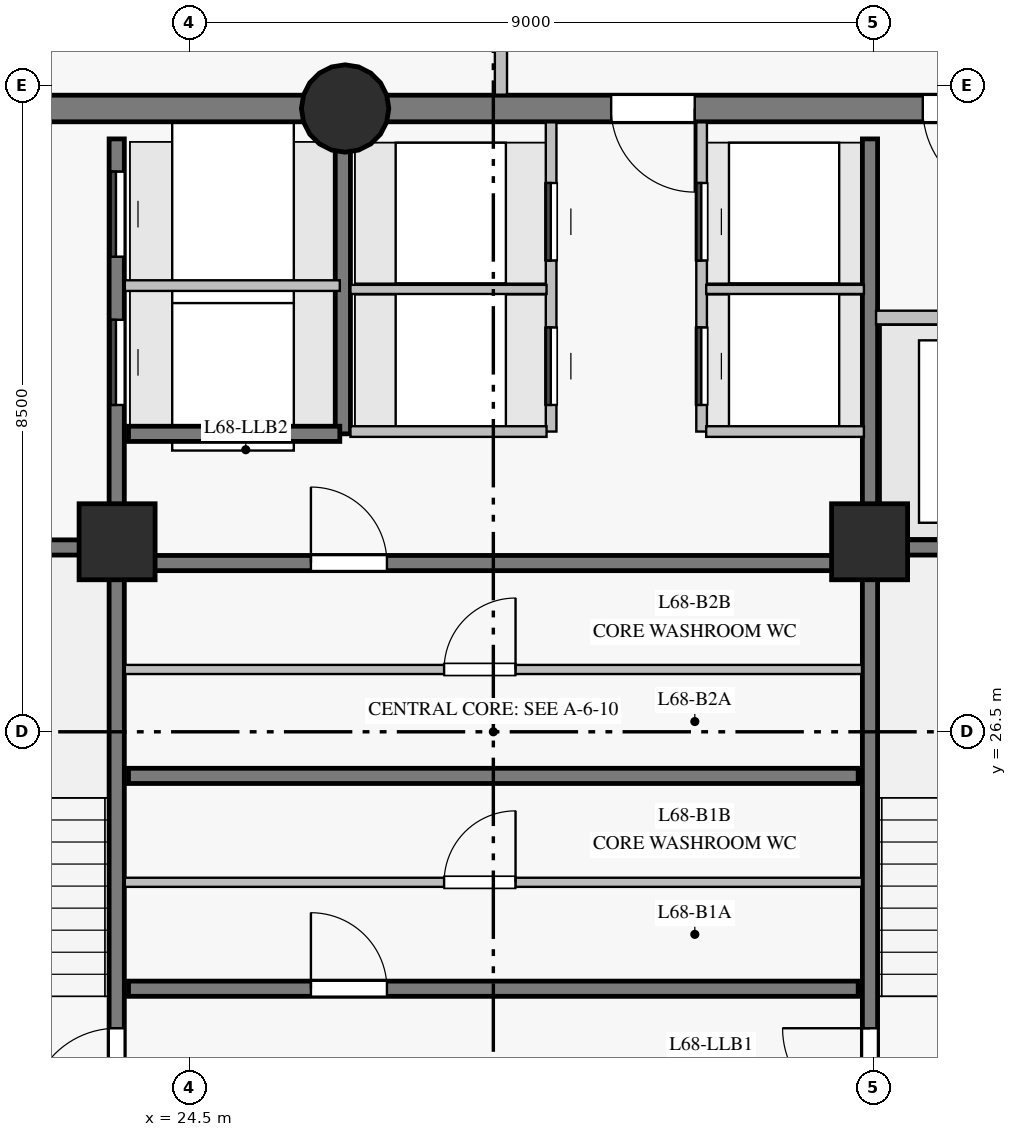
"""IFC4 building model, lengths in metres.
Left out: names, types, materials, properties, quantities, classifications, styles, units other than length and angle.
Written with IfcOpenShell. Run it as: python <this file> out.ifc"""

import sys

from ifc_helpers import new_model, si_unit, direction, frame, frame_2d, origin, origin_with_axes, origin_2d, place, context, subcontext, project, spatial, rectangle, circle, extrude, source, transform, mapped, element, fill, save


model = new_model("IFC4")
c1 = context("Model", 3, precision=1e-05, world=origin(), true_north=direction((0.0, 1.0)))
c2 = subcontext(c1, "Body", "Model", "MODEL_VIEW")
j1 = project(units=[si_unit("LENGTHUNIT", "METRE"), si_unit("PLANEANGLEUNIT", "RADIAN")], contexts=[c1])
p1 = place(None, origin())
s1 = spatial("IfcSite", under=j1, at=p1, CompositionType="ELEMENT")
p2 = place(p1, origin())
s2 = spatial("IfcBuilding", under=s1, at=p2, CompositionType="ELEMENT")
p3 = place(p2, frame((0.0, 0.0, 232.15)))
s3 = spatial("IfcBuildingStorey", under=s2, at=p3, CompositionType="ELEMENT", Elevation=232.15)
p4 = place(p3, frame((37.5, 34.7, 0.0), z_axis=(0.0, 0.0, 1.0), x_axis=(-1.0, 0.0, 0.0)))
e1 = element("IfcWall", 1, at=p4, inside=s3, PredefinedType="SHEAR", context=c2, shape_type="SweptSolid", body=[
    extrude(rectangle(XDim=10.95, YDim=0.35, at=frame_2d((5.475, 0.0))), origin(), (0.0, 0.0, 1.0), 2.85),
])
p5 = place(p4, frame((2.15, 0.0, 0.0)))
e2 = element("IfcOpeningElement", 2, at=p5, cuts=e1, PredefinedType="OPENING", context=c2, shape_type="SweptSolid", body=[
    extrude(rectangle(XDim=1.2, YDim=2.15, at=frame_2d((0.6, 1.075))), frame((0.0, 0.185, 0.0), z_axis=(0.0, -1.0, 0.0), x_axis=(1.0, 0.0, 0.0)), (0.0, 0.0, 1.0), 0.37),
])
p6 = place(p4, frame((6.35, 0.0, 0.0)))
e3 = element("IfcOpeningElement", 3, at=p6, cuts=e1, PredefinedType="OPENING", context=c2, shape_type="SweptSolid", body=[
    extrude(rectangle(XDim=1.1, YDim=2.15, at=frame_2d((0.55, 1.075))), frame((0.0, 0.185, 0.0), z_axis=(0.0, -1.0, 0.0), x_axis=(1.0, 0.0, 0.0)), (0.0, 0.0, 1.0), 0.37),
])
p7 = place(p3, frame((26.55, 34.7, 0.0), z_axis=(0.0, 0.0, 1.0), x_axis=(-1.0, 0.0, 0.0)))
e4 = element("IfcWall", 4, at=p7, inside=s3, PredefinedType="SHEAR", context=c2, shape_type="SweptSolid", body=[
    extrude(rectangle(XDim=7.05, YDim=0.35, at=frame_2d((3.525, 0.0))), origin(), (0.0, 0.0, 1.0), 2.85),
])
m1 = source(origin_with_axes(), c2, "Body", "SweptSolid", [
    extrude(circle(Radius=0.575, at=origin_2d()), origin(), (0.0, 0.0, 1.0), 3.05),
])
p8 = place(p3, frame((26.55, 34.7, 0.0), z_axis=(0.0, 0.0, 1.0), x_axis=(1.0, 0.0, 0.0)))
e5 = element("IfcColumn", 5, at=p8, inside=s3, PredefinedType="COLUMN", context=c2, shape_type="MappedRepresentation", body=[
    mapped(m1, transform((0.0, 0.0, 0.0), scale=1.0)),
])
m2 = source(origin_with_axes(), c2, "Body", "SweptSolid", [
    extrude(rectangle(XDim=1.0, YDim=1.0, at=origin_2d()), origin(), (0.0, 0.0, 1.0), 3.05),
])
for number, where, z_axis, x_axis in (
    (6, (23.55, 29.0, 0.0), (0.0, 0.0, 1.0), (1.0, 0.0, 0.0)),
    (7, (33.45, 29.0, 0.0), (0.0, 0.0, 1.0), (1.0, 0.0, 0.0)),
):
    element("IfcColumn", number, at=place(p3, frame(where, z_axis=z_axis, x_axis=x_axis)), inside=s3, PredefinedType="COLUMN", context=c2, shape_type="MappedRepresentation", body=[
        mapped(m2, transform((0.0, 0.0, 0.0), scale=1.0)),
    ])
p9 = place(p3, frame((23.545, 18.7, 0.0), z_axis=(0.0, 0.0, 1.0), x_axis=(0.0, 1.0, 0.0)))
e8 = element("IfcWall", 8, at=p9, inside=s3, PredefinedType="SHEAR", context=c2, shape_type="SweptSolid", body=[
    extrude(rectangle(XDim=15.6, YDim=0.2, at=frame_2d((7.8, 0.0))), origin(), (0.0, 0.0, 1.0), 2.85),
])
p10 = place(p9, frame((2.75, 0.0, 0.0)))
e9 = element("IfcOpeningElement", 9, at=p10, cuts=e8, PredefinedType="OPENING", context=c2, shape_type="SweptSolid", body=[
    extrude(rectangle(XDim=1.15, YDim=2.15, at=frame_2d((0.575, 1.075))), frame((0.0, 0.11, 0.0), z_axis=(0.0, -1.0, 0.0), x_axis=(1.0, 0.0, 0.0)), (0.0, 0.0, 1.0), 0.22),
])
p11 = place(p9, frame((0.14, 0.0, 0.0)))
e10 = element("IfcOpeningElement", 10, at=p11, cuts=e8, PredefinedType="OPENING", context=c2, shape_type="SweptSolid", body=[
    extrude(rectangle(XDim=0.88, YDim=2.1, at=frame_2d((0.44, 1.05))), frame((0.0, 0.11, 0.0), z_axis=(0.0, -1.0, 0.0), x_axis=(1.0, 0.0, 0.0)), (0.0, 0.0, 1.0), 0.22),
])
p12 = place(p9, frame((1.36, 0.0, 0.0)))
e11 = element("IfcOpeningElement", 11, at=p12, cuts=e8, PredefinedType="OPENING", context=c2, shape_type="SweptSolid", body=[
    extrude(rectangle(XDim=0.88, YDim=2.1, at=frame_2d((0.44, 1.05))), frame((0.0, 0.11, 0.0), z_axis=(0.0, -1.0, 0.0), x_axis=(1.0, 0.0, 0.0)), (0.0, 0.0, 1.0), 0.22),
])
p13 = place(p9, frame((12.1, 0.0, 0.0)))
e12 = element("IfcOpeningElement", 12, at=p13, cuts=e8, PredefinedType="OPENING", context=c2, shape_type="SweptSolid", body=[
    extrude(rectangle(XDim=1.12, YDim=2.15, at=frame_2d((0.56, 1.075))), frame((0.0, 0.11, 0.0), z_axis=(0.0, -1.0, 0.0), x_axis=(1.0, 0.0, 0.0)), (0.0, 0.0, 1.0), 0.22),
])
p14 = place(p9, frame((14.05, 0.0, 0.0)))
e13 = element("IfcOpeningElement", 13, at=p14, cuts=e8, PredefinedType="OPENING", context=c2, shape_type="SweptSolid", body=[
    extrude(rectangle(XDim=1.12, YDim=2.15, at=frame_2d((0.56, 1.075))), frame((0.0, 0.11, 0.0), z_axis=(0.0, -1.0, 0.0), x_axis=(1.0, 0.0, 0.0)), (0.0, 0.0, 1.0), 0.22),
])
p15 = place(p3, frame((33.455, 18.7, 0.0), z_axis=(0.0, 0.0, 1.0), x_axis=(0.0, 1.0, 0.0)))
e14 = element("IfcWall", 14, at=p15, inside=s3, PredefinedType="SHEAR", context=c2, shape_type="SweptSolid", body=[
    extrude(rectangle(XDim=15.6, YDim=0.2, at=frame_2d((7.8, 0.0))), origin(), (0.0, 0.0, 1.0), 2.85),
])
p16 = place(p15, frame((2.75, 0.0, 0.0)))
e15 = element("IfcOpeningElement", 15, at=p16, cuts=e14, PredefinedType="OPENING", context=c2, shape_type="SweptSolid", body=[
    extrude(rectangle(XDim=1.15, YDim=2.15, at=frame_2d((0.575, 1.075))), frame((0.0, 0.11, 0.0), z_axis=(0.0, -1.0, 0.0), x_axis=(1.0, 0.0, 0.0)), (0.0, 0.0, 1.0), 0.22),
])
p17 = place(p15, frame((0.55, 0.0, 0.0)))
e16 = element("IfcOpeningElement", 16, at=p17, cuts=e14, PredefinedType="OPENING", context=c2, shape_type="SweptSolid", body=[
    extrude(rectangle(XDim=0.94, YDim=2.1, at=frame_2d((0.47, 1.05))), frame((0.0, 0.11, 0.0), z_axis=(0.0, -1.0, 0.0), x_axis=(1.0, 0.0, 0.0)), (0.0, 0.0, 1.0), 0.22),
])
p18 = place(p3, frame((23.7, 23.12, 0.0), z_axis=(0.0, 0.0, 1.0), x_axis=(1.0, 0.0, 0.0)))
e17 = element("IfcWall", 17, at=p18, inside=s3, PredefinedType="SHEAR", context=c2, shape_type="SweptSolid", body=[
    extrude(rectangle(XDim=9.6, YDim=0.2, at=frame_2d((4.8, 0.0))), origin(), (0.0, 0.0, 1.0), 2.85),
])
p19 = place(p18, frame((2.4, 0.0, 0.0)))
e18 = element("IfcOpeningElement", 18, at=p19, cuts=e17, PredefinedType="OPENING", context=c2, shape_type="SweptSolid", body=[
    extrude(rectangle(XDim=1.0, YDim=2.15, at=frame_2d((0.5, 1.075))), frame((0.0, 0.11, 0.0), z_axis=(0.0, -1.0, 0.0), x_axis=(1.0, 0.0, 0.0)), (0.0, 0.0, 1.0), 0.22),
])
p20 = place(p3, frame((23.7, 25.92, 0.0), z_axis=(0.0, 0.0, 1.0), x_axis=(1.0, 0.0, 0.0)))
e19 = element("IfcWall", 19, at=p20, inside=s3, PredefinedType="SHEAR", context=c2, shape_type="SweptSolid", body=[
    extrude(rectangle(XDim=9.6, YDim=0.2, at=frame_2d((4.8, 0.0))), origin(), (0.0, 0.0, 1.0), 2.85),
])
p21 = place(p3, frame((23.7, 28.72, 0.0), z_axis=(0.0, 0.0, 1.0), x_axis=(1.0, 0.0, 0.0)))
e20 = element("IfcWall", 20, at=p21, inside=s3, PredefinedType="SHEAR", context=c2, shape_type="SweptSolid", body=[
    extrude(rectangle(XDim=9.6, YDim=0.2, at=frame_2d((4.8, 0.0))), origin(), (0.0, 0.0, 1.0), 2.85),
])
p22 = place(p21, frame((2.4, 0.0, 0.0)))
e21 = element("IfcOpeningElement", 21, at=p22, cuts=e20, PredefinedType="OPENING", context=c2, shape_type="SweptSolid", body=[
    extrude(rectangle(XDim=1.0, YDim=2.15, at=frame_2d((0.5, 1.075))), frame((0.0, 0.11, 0.0), z_axis=(0.0, -1.0, 0.0), x_axis=(1.0, 0.0, 0.0)), (0.0, 0.0, 1.0), 0.22),
])
for number, where, z_axis, x_axis in (
    (22, (33.455, 28.925, 0.0), (0.0, 0.0, 1.0), (1.0, 0.0, 0.0)),
    (23, (19.55, 28.925, 0.0), (0.0, 0.0, 1.0), (1.0, 0.0, 0.0)),
):
    element("IfcWall", number, at=place(p3, frame(where, z_axis=z_axis, x_axis=x_axis)), inside=s3, PredefinedType="SHEAR", context=c2, shape_type="SweptSolid", body=[
        extrude(rectangle(XDim=3.995, YDim=0.2, at=frame_2d((1.998, 0.0))), origin(), (0.0, 0.0, 1.0), 2.85),
    ])
p23 = place(p3, frame((26.52, 30.42, 0.0), z_axis=(0.0, 0.0, 1.0), x_axis=(0.0, 1.0, 0.0)))
e24 = element("IfcWall", 24, at=p23, inside=s3, PredefinedType="SHEAR", context=c2, shape_type="SweptSolid", body=[
    extrude(rectangle(XDim=3.86, YDim=0.2, at=frame_2d((1.93, 0.0))), origin(), (0.0, 0.0, 1.0), 2.85),
])
p24 = place(p3, frame((23.7, 30.42, 0.0), z_axis=(0.0, 0.0, 1.0), x_axis=(1.0, 0.0, 0.0)))
e25 = element("IfcWall", 25, at=p24, inside=s3, PredefinedType="SHEAR", context=c2, shape_type="SweptSolid", body=[
    extrude(rectangle(XDim=2.78, YDim=0.2, at=frame_2d((1.39, 0.0))), origin(), (0.0, 0.0, 1.0), 2.85),
])
p25 = place(p3, frame((23.652, 24.52, 0.0), z_axis=(0.0, 0.0, 1.0), x_axis=(1.0, 0.0, 0.0)))
e26 = element("IfcWall", 26, at=p25, inside=s3, PredefinedType="PARTITIONING", context=c2, shape_type="SweptSolid", body=[
    extrude(rectangle(XDim=9.698, YDim=0.12, at=frame_2d((4.849, 0.0))), origin(), (0.0, 0.0, 1.0), 2.85),
])
p26 = place(p25, frame((4.2, 0.0, 0.0)))
e27 = element("IfcOpeningElement", 27, at=p26, cuts=e26, PredefinedType="OPENING", context=c2, shape_type="SweptSolid", body=[
    extrude(rectangle(XDim=0.94, YDim=2.1, at=frame_2d((0.47, 1.05))), frame((0.0, 0.07, 0.0), z_axis=(0.0, -1.0, 0.0), x_axis=(1.0, 0.0, 0.0)), (0.0, 0.0, 1.0), 0.14),
])
p27 = place(p3, frame((23.652, 27.32, 0.0), z_axis=(0.0, 0.0, 1.0), x_axis=(1.0, 0.0, 0.0)))
e28 = element("IfcWall", 28, at=p27, inside=s3, PredefinedType="PARTITIONING", context=c2, shape_type="SweptSolid", body=[
    extrude(rectangle(XDim=9.698, YDim=0.12, at=frame_2d((4.849, 0.0))), origin(), (0.0, 0.0, 1.0), 2.85),
])
p28 = place(p27, frame((4.2, 0.0, 0.0)))
e29 = element("IfcOpeningElement", 29, at=p28, cuts=e28, PredefinedType="OPENING", context=c2, shape_type="SweptSolid", body=[
    extrude(rectangle(XDim=0.94, YDim=2.1, at=frame_2d((0.47, 1.05))), frame((0.0, 0.07, 0.0), z_axis=(0.0, -1.0, 0.0), x_axis=(1.0, 0.0, 0.0)), (0.0, 0.0, 1.0), 0.14),
])
p29 = place(p3, frame((29.26, 30.45, 0.0), z_axis=(0.0, 0.0, 1.0), x_axis=(0.0, 1.0, 0.0)))
e30 = element("IfcWall", 30, at=p29, inside=s3, PredefinedType="PARTITIONING", context=c2, shape_type="SweptSolid", body=[
    extrude(rectangle(XDim=4.068, YDim=0.14, at=frame_2d((2.034, 0.0))), origin(), (0.0, 0.0, 1.0), 2.85),
])
p30 = place(p29, frame((0.35, 0.0, 0.0)))
e31 = element("IfcOpeningElement", 31, at=p30, cuts=e30, PredefinedType="OPENING", context=c2, shape_type="SweptSolid", body=[
    extrude(rectangle(XDim=1.02, YDim=2.15, at=frame_2d((0.51, 1.075))), frame((0.0, 0.08, 0.0), z_axis=(0.0, -1.0, 0.0), x_axis=(1.0, 0.0, 0.0)), (0.0, 0.0, 1.0), 0.16),
])
p31 = place(p29, frame((2.25, 0.0, 0.0)))
e32 = element("IfcOpeningElement", 32, at=p31, cuts=e30, PredefinedType="OPENING", context=c2, shape_type="SweptSolid", body=[
    extrude(rectangle(XDim=1.02, YDim=2.15, at=frame_2d((0.51, 1.075))), frame((0.0, 0.08, 0.0), z_axis=(0.0, -1.0, 0.0), x_axis=(1.0, 0.0, 0.0)), (0.0, 0.0, 1.0), 0.16),
])
p32 = place(p3, frame((31.24, 30.45, 0.0), z_axis=(0.0, 0.0, 1.0), x_axis=(0.0, 1.0, 0.0)))
e33 = element("IfcWall", 33, at=p32, inside=s3, PredefinedType="PARTITIONING", context=c2, shape_type="SweptSolid", body=[
    extrude(rectangle(XDim=4.068, YDim=0.14, at=frame_2d((2.034, 0.0))), origin(), (0.0, 0.0, 1.0), 2.85),
])
p33 = place(p32, frame((0.35, 0.0, 0.0)))
e34 = element("IfcOpeningElement", 34, at=p33, cuts=e33, PredefinedType="OPENING", context=c2, shape_type="SweptSolid", body=[
    extrude(rectangle(XDim=1.02, YDim=2.15, at=frame_2d((0.51, 1.075))), frame((0.0, 0.08, 0.0), z_axis=(0.0, -1.0, 0.0), x_axis=(1.0, 0.0, 0.0)), (0.0, 0.0, 1.0), 0.16),
])
p34 = place(p32, frame((2.25, 0.0, 0.0)))
e35 = element("IfcOpeningElement", 35, at=p34, cuts=e33, PredefinedType="OPENING", context=c2, shape_type="SweptSolid", body=[
    extrude(rectangle(XDim=1.02, YDim=2.15, at=frame_2d((0.51, 1.075))), frame((0.0, 0.08, 0.0), z_axis=(0.0, -1.0, 0.0), x_axis=(1.0, 0.0, 0.0)), (0.0, 0.0, 1.0), 0.16),
])
p35 = place(p3, frame((33.535, 31.95, 0.0), z_axis=(0.0, 0.0, 1.0), x_axis=(1.0, 0.0, 0.0)))
e36 = element("IfcWall", 36, at=p35, inside=s3, PredefinedType="PARTITIONING", context=c2, shape_type="SweptSolid", body=[
    extrude(rectangle(XDim=3.784, YDim=0.18, at=frame_2d((1.892, 0.0))), origin(), (0.0, 0.0, 1.0), 2.85),
])
p36 = place(p35, frame((0.9, 0.0, 0.0)))
e37 = element("IfcOpeningElement", 37, at=p36, cuts=e36, PredefinedType="OPENING", context=c2, shape_type="SweptSolid", body=[
    extrude(rectangle(XDim=1.3, YDim=2.2, at=frame_2d((0.65, 1.1))), frame((0.0, 0.1, 0.0), z_axis=(0.0, -1.0, 0.0), x_axis=(1.0, 0.0, 0.0)), (0.0, 0.0, 1.0), 0.2),
])
p37 = place(p3, frame((23.652, 32.37, 0.0), z_axis=(0.0, 0.0, 1.0), x_axis=(1.0, 0.0, 0.0)))
e38 = element("IfcWall", 38, at=p37, inside=s3, PredefinedType="PARTITIONING", context=c2, shape_type="SweptSolid", body=[
    extrude(rectangle(XDim=2.828, YDim=0.14, at=frame_2d((1.414, 0.0))), origin(), (0.0, 0.0, 1.0), 2.85),
])
p38 = place(p3, frame((26.62, 30.45, 0.0), z_axis=(0.0, 0.0, 1.0), x_axis=(1.0, 0.0, 0.0)))
e39 = element("IfcWall", 39, at=p38, inside=s3, PredefinedType="PARTITIONING", context=c2, shape_type="SweptSolid", body=[
    extrude(rectangle(XDim=2.58, YDim=0.14, at=frame_2d((1.29, 0.0))), origin(), (0.0, 0.0, 1.0), 2.85),
])
p39 = place(p3, frame((26.62, 32.32, 0.0), z_axis=(0.0, 0.0, 1.0), x_axis=(1.0, 0.0, 0.0)))
e40 = element("IfcWall", 40, at=p39, inside=s3, PredefinedType="PARTITIONING", context=c2, shape_type="SweptSolid", body=[
    extrude(rectangle(XDim=2.58, YDim=0.12, at=frame_2d((1.29, 0.0))), origin(), (0.0, 0.0, 1.0), 2.85),
])
p40 = place(p3, frame((31.3, 30.45, 0.0), z_axis=(0.0, 0.0, 1.0), x_axis=(1.0, 0.0, 0.0)))
e41 = element("IfcWall", 41, at=p40, inside=s3, PredefinedType="PARTITIONING", context=c2, shape_type="SweptSolid", body=[
    extrude(rectangle(XDim=2.075, YDim=0.14, at=frame_2d((1.038, 0.0))), origin(), (0.0, 0.0, 1.0), 2.85),
])
p41 = place(p3, frame((31.3, 32.32, 0.0), z_axis=(0.0, 0.0, 1.0), x_axis=(1.0, 0.0, 0.0)))
e42 = element("IfcWall", 42, at=p41, inside=s3, PredefinedType="PARTITIONING", context=c2, shape_type="SweptSolid", body=[
    extrude(rectangle(XDim=2.075, YDim=0.12, at=frame_2d((1.038, 0.0))), origin(), (0.0, 0.0, 1.0), 2.85),
])
p42 = place(p3, frame((28.6, 34.882, 0.0), z_axis=(0.0, 0.0, 1.0), x_axis=(0.0, 1.0, 0.0)))
e43 = element("IfcWall", 43, at=p42, inside=s3, PredefinedType="PARTITIONING", context=c2, shape_type="SweptSolid", body=[
    extrude(rectangle(XDim=1.518, YDim=0.16, at=frame_2d((0.759, 0.0))), origin(), (0.0, 0.0, 1.0), 2.85),
])
m3 = source(origin_with_axes(), c2, "Body", "SweptSolid", [
    extrude(rectangle(XDim=1.15, YDim=2.15, at=frame_2d((0.575, 1.075))), frame((0.0, 0.025, 0.0), z_axis=(0.0, -1.0, 0.0), x_axis=(1.0, 0.0, 0.0)), (0.0, 0.0, 1.0), 0.05),
])
p43 = place(p10, origin())
e44 = element("IfcDoor", 44, at=p43, inside=s3, OperationType="SINGLE_SWING_LEFT", PredefinedType="DOOR", context=c2, shape_type="MappedRepresentation", body=[
    mapped(m3, transform((0.0, 0.0, 0.0), scale=1.0)),
])
fill(e9, e44)
p44 = place(p16, origin())
e45 = element("IfcDoor", 45, at=p44, inside=s3, OperationType="SINGLE_SWING_RIGHT", PredefinedType="DOOR", context=c2, shape_type="MappedRepresentation", body=[
    mapped(m3, transform((0.0, 0.0, 0.0), scale=1.0)),
])
fill(e15, e45)
m4 = source(origin_with_axes(), c2, "Body", "SweptSolid", [
    extrude(rectangle(XDim=1.2, YDim=2.15, at=frame_2d((0.6, 1.075))), frame((0.0, 0.025, 0.0), z_axis=(0.0, -1.0, 0.0), x_axis=(1.0, 0.0, 0.0)), (0.0, 0.0, 1.0), 0.05),
])
p45 = place(p5, origin())
e46 = element("IfcDoor", 46, at=p45, inside=s3, OperationType="SINGLE_SWING_LEFT", PredefinedType="DOOR", context=c2, shape_type="MappedRepresentation", body=[
    mapped(m4, transform((0.0, 0.0, 0.0), scale=1.0)),
])
fill(e2, e46)
m5 = source(origin_with_axes(), c2, "Body", "SweptSolid", [
    extrude(rectangle(XDim=1.0, YDim=2.15, at=frame_2d((0.5, 1.075))), frame((0.0, 0.025, 0.0), z_axis=(0.0, -1.0, 0.0), x_axis=(1.0, 0.0, 0.0)), (0.0, 0.0, 1.0), 0.05),
])
p46 = place(p19, origin())
e47 = element("IfcDoor", 47, at=p46, inside=s3, OperationType="SINGLE_SWING_LEFT", PredefinedType="DOOR", context=c2, shape_type="MappedRepresentation", body=[
    mapped(m5, transform((0.0, 0.0, 0.0), scale=1.0)),
])
fill(e18, e47)
m6 = source(origin_with_axes(), c2, "Body", "SweptSolid", [
    extrude(rectangle(XDim=0.94, YDim=2.1, at=frame_2d((0.47, 1.05))), frame((0.0, 0.025, 0.0), z_axis=(0.0, -1.0, 0.0), x_axis=(1.0, 0.0, 0.0)), (0.0, 0.0, 1.0), 0.05),
])
p47 = place(p26, origin())
e48 = element("IfcDoor", 48, at=p47, inside=s3, OperationType="SINGLE_SWING_RIGHT", PredefinedType="DOOR", context=c2, shape_type="MappedRepresentation", body=[
    mapped(m6, transform((0.0, 0.0, 0.0), scale=1.0)),
])
fill(e27, e48)
p48 = place(p22, origin())
e49 = element("IfcDoor", 49, at=p48, inside=s3, OperationType="SINGLE_SWING_LEFT", PredefinedType="DOOR", context=c2, shape_type="MappedRepresentation", body=[
    mapped(m5, transform((0.0, 0.0, 0.0), scale=1.0)),
])
fill(e21, e49)
p49 = place(p28, origin())
e50 = element("IfcDoor", 50, at=p49, inside=s3, OperationType="SINGLE_SWING_RIGHT", PredefinedType="DOOR", context=c2, shape_type="MappedRepresentation", body=[
    mapped(m6, transform((0.0, 0.0, 0.0), scale=1.0)),
])
fill(e29, e50)
m7 = source(origin_with_axes(), c2, "Body", "SweptSolid", [
    extrude(rectangle(XDim=1.1, YDim=2.15, at=frame_2d((0.55, 1.075))), frame((0.0, 0.025, 0.0), z_axis=(0.0, -1.0, 0.0), x_axis=(1.0, 0.0, 0.0)), (0.0, 0.0, 1.0), 0.05),
])
p50 = place(p6, origin())
e51 = element("IfcDoor", 51, at=p50, inside=s3, OperationType="SINGLE_SWING_LEFT", PredefinedType="DOOR", context=c2, shape_type="MappedRepresentation", body=[
    mapped(m7, transform((0.0, 0.0, 0.0), scale=1.0)),
])
fill(e3, e51)
m8 = source(origin_with_axes(), c2, "Body", "SweptSolid", [
    extrude(rectangle(XDim=1.12, YDim=2.15, at=frame_2d((0.56, 1.075))), frame((0.0, 0.025, 0.0), z_axis=(0.0, -1.0, 0.0), x_axis=(1.0, 0.0, 0.0)), (0.0, 0.0, 1.0), 0.05),
])
p51 = place(p13, origin())
e52 = element("IfcDoor", 52, at=p51, inside=s3, OperationType="SLIDING_TO_LEFT", PredefinedType="DOOR", context=c2, shape_type="MappedRepresentation", body=[
    mapped(m8, transform((0.0, 0.0, 0.0), scale=1.0)),
])
fill(e12, e52)
p52 = place(p14, origin())
e53 = element("IfcDoor", 53, at=p52, inside=s3, OperationType="SLIDING_TO_RIGHT", PredefinedType="DOOR", context=c2, shape_type="MappedRepresentation", body=[
    mapped(m8, transform((0.0, 0.0, 0.0), scale=1.0)),
])
fill(e13, e53)
m9 = source(origin_with_axes(), c2, "Body", "SweptSolid", [
    extrude(rectangle(XDim=1.02, YDim=2.15, at=frame_2d((0.51, 1.075))), frame((0.0, 0.025, 0.0), z_axis=(0.0, -1.0, 0.0), x_axis=(1.0, 0.0, 0.0)), (0.0, 0.0, 1.0), 0.05),
])
p53 = place(p30, origin())
e54 = element("IfcDoor", 54, at=p53, inside=s3, OperationType="SLIDING_TO_LEFT", PredefinedType="DOOR", context=c2, shape_type="MappedRepresentation", body=[
    mapped(m9, transform((0.0, 0.0, 0.0), scale=1.0)),
])
fill(e31, e54)
p54 = place(p31, origin())
e55 = element("IfcDoor", 55, at=p54, inside=s3, OperationType="SLIDING_TO_LEFT", PredefinedType="DOOR", context=c2, shape_type="MappedRepresentation", body=[
    mapped(m9, transform((0.0, 0.0, 0.0), scale=1.0)),
])
fill(e32, e55)
p55 = place(p33, origin())
e56 = element("IfcDoor", 56, at=p55, inside=s3, OperationType="SLIDING_TO_LEFT", PredefinedType="DOOR", context=c2, shape_type="MappedRepresentation", body=[
    mapped(m9, transform((0.0, 0.0, 0.0), scale=1.0)),
])
fill(e34, e56)
p56 = place(p34, origin())
e57 = element("IfcDoor", 57, at=p56, inside=s3, OperationType="SLIDING_TO_LEFT", PredefinedType="DOOR", context=c2, shape_type="MappedRepresentation", body=[
    mapped(m9, transform((0.0, 0.0, 0.0), scale=1.0)),
])
fill(e35, e57)
save(model, sys.argv[1])
